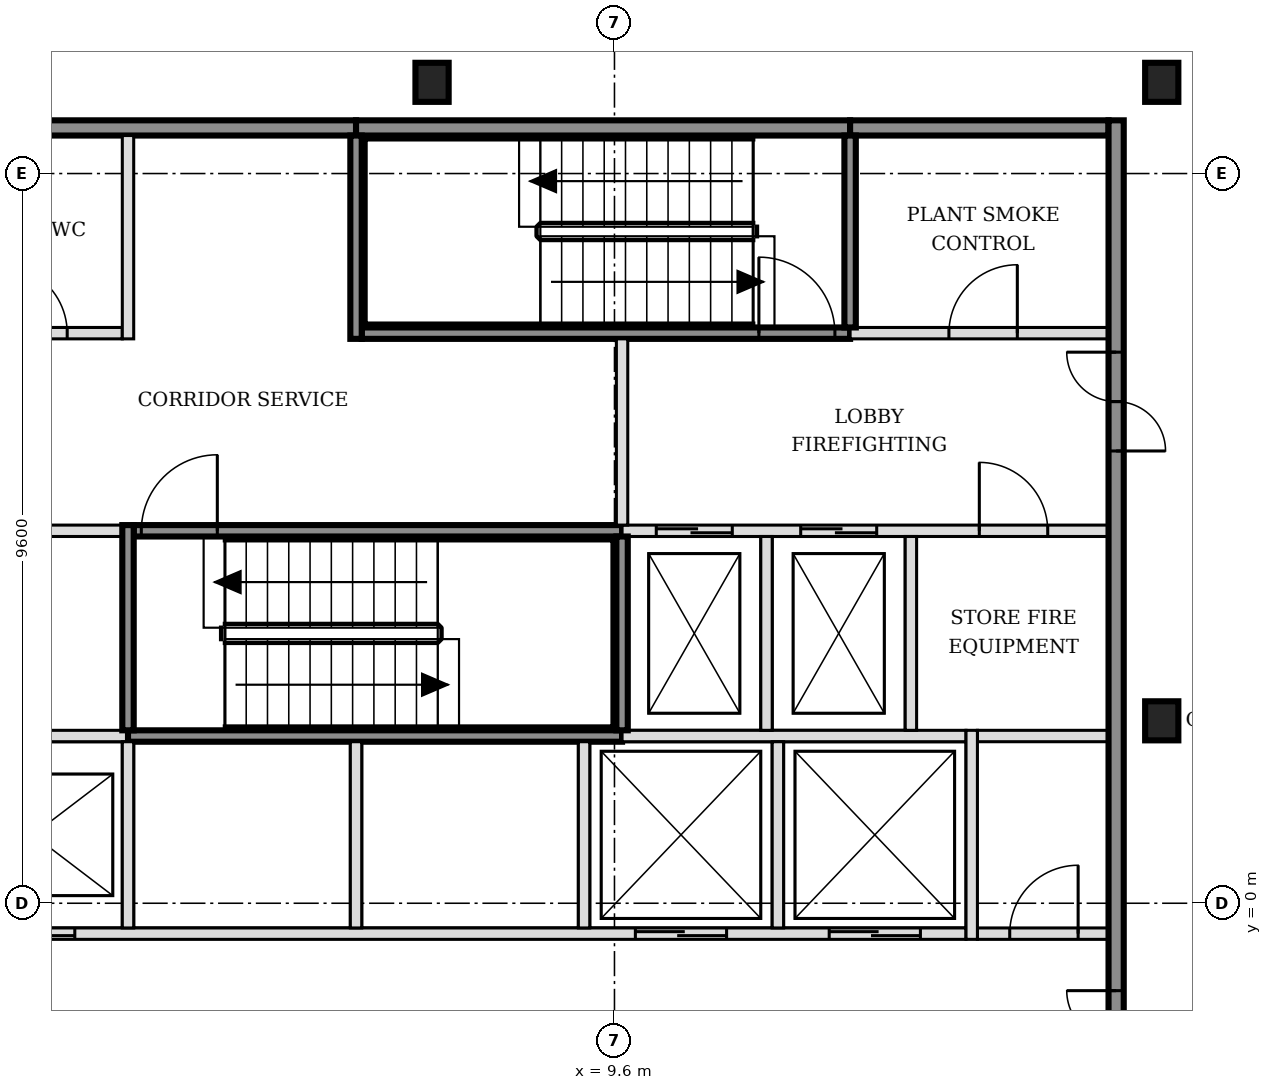
"""IFC4 building model, lengths in metres.
Left out: names, types, materials, properties, quantities, classifications, styles, units other than length and angle.
Written with IfcOpenShell. Run it as: python <this file> out.ifc"""

import sys

from ifc_helpers import new_model, si_unit, direction, frame, frame_2d, origin, origin_2d, place, context, subcontext, project, spatial, rectangle, i_section, extrude, element, fill, save


model = new_model("IFC4")
c1 = context("Model", 3, precision=1e-05, world=origin(), true_north=direction((0.0, 1.0)))
c2 = subcontext(c1, "Body", "Model", "MODEL_VIEW")
j1 = project(units=[si_unit("LENGTHUNIT", "METRE"), si_unit("PLANEANGLEUNIT", "RADIAN")], contexts=[c1])
p1 = place(None, origin())
s1 = spatial("IfcSite", under=j1, at=p1, CompositionType="ELEMENT")
p2 = place(p1, origin())
s2 = spatial("IfcBuilding", under=s1, at=p2, CompositionType="ELEMENT")
p3 = place(p2, frame((0.0, 0.0, 101.4)))
s3 = spatial("IfcBuildingStorey", under=s2, at=p3, CompositionType="ELEMENT", Elevation=101.4)
for number, where, z_axis, x_axis in (
    (1, (16.8, 2.4, -0.15), (0.0, 0.0, 1.0), (1.0, 0.0, 0.0)),
    (2, (7.2, 10.8, -0.15), (0.0, 0.0, 1.0), (1.0, 0.0, 0.0)),
    (3, (16.8, 10.8, -0.15), (0.0, 0.0, 1.0), (1.0, 0.0, 0.0)),
):
    element("IfcColumn", number, at=place(p3, frame(where, z_axis=z_axis, x_axis=x_axis)), inside=s3, PredefinedType="COLUMN", context=c2, shape_type="SweptSolid", body=[
        extrude(i_section(OverallWidth=0.437, OverallDepth=0.514, WebThickness=0.061, FlangeThickness=0.097, FilletRadius=0.015, at=origin_2d()), origin(), (0.0, 0.0, 1.0), 3.6),
    ])
p4 = place(p3, frame((-1.7, -0.4, 0.0), z_axis=(0.0, 0.0, 1.0), x_axis=(1.0, 0.0, 0.0)))
e4 = element("IfcWall", 4, at=p4, inside=s3, PredefinedType="SOLIDWALL", context=c2, shape_type="SweptSolid", body=[
    extrude(rectangle(XDim=15.925, YDim=0.15, at=frame_2d((7.962, 0.0))), origin(), (0.0, 0.0, 1.0), 3.45),
])
p5 = place(p4, frame((0.6, 0.0, 0.0)))
e5 = element("IfcOpeningElement", 5, at=p5, cuts=e4, PredefinedType="OPENING", context=c2, shape_type="SweptSolid", body=[
    extrude(rectangle(XDim=1.1, YDim=2.1, at=frame_2d((0.55, 1.05))), frame((0.0, 0.085, 0.0), z_axis=(0.0, -1.0, 0.0), x_axis=(1.0, 0.0, 0.0)), (0.0, 0.0, 1.0), 0.17),
])
p6 = place(p4, frame((3.1, 0.0, 0.0)))
e6 = element("IfcOpeningElement", 6, at=p6, cuts=e4, PredefinedType="OPENING", context=c2, shape_type="SweptSolid", body=[
    extrude(rectangle(XDim=1.1, YDim=2.1, at=frame_2d((0.55, 1.05))), frame((0.0, 0.085, 0.0), z_axis=(0.0, -1.0, 0.0), x_axis=(1.0, 0.0, 0.0)), (0.0, 0.0, 1.0), 0.17),
])
p7 = place(p4, frame((11.575, 0.0, 0.0)))
e7 = element("IfcOpeningElement", 7, at=p7, cuts=e4, PredefinedType="OPENING", context=c2, shape_type="SweptSolid", body=[
    extrude(rectangle(XDim=1.2, YDim=2.1, at=frame_2d((0.6, 1.05))), frame((0.0, 0.085, 0.0), z_axis=(0.0, -1.0, 0.0), x_axis=(1.0, 0.0, 0.0)), (0.0, 0.0, 1.0), 0.17),
])
p8 = place(p4, frame((14.125, 0.0, 0.0)))
e8 = element("IfcOpeningElement", 8, at=p8, cuts=e4, PredefinedType="OPENING", context=c2, shape_type="SweptSolid", body=[
    extrude(rectangle(XDim=1.2, YDim=2.1, at=frame_2d((0.6, 1.05))), frame((0.0, 0.085, 0.0), z_axis=(0.0, -1.0, 0.0), x_axis=(1.0, 0.0, 0.0)), (0.0, 0.0, 1.0), 0.17),
])
p9 = place(p3, frame((14.375, -0.4, 0.0), z_axis=(0.0, 0.0, 1.0), x_axis=(1.0, 0.0, 0.0)))
e9 = element("IfcWall", 9, at=p9, inside=s3, PredefinedType="PARTITIONING", context=c2, shape_type="SweptSolid", body=[
    extrude(rectangle(XDim=1.725, YDim=0.15, at=frame_2d((0.863, 0.0))), origin(), (0.0, 0.0, 1.0), 3.45),
])
p10 = place(p9, frame((0.425, 0.0, 0.0)))
e10 = element("IfcOpeningElement", 10, at=p10, cuts=e9, PredefinedType="OPENING", context=c2, shape_type="SweptSolid", body=[
    extrude(rectangle(XDim=0.9, YDim=2.1, at=frame_2d((0.45, 1.05))), frame((0.0, 0.085, 0.0), z_axis=(0.0, -1.0, 0.0), x_axis=(1.0, 0.0, 0.0)), (0.0, 0.0, 1.0), 0.17),
])
p11 = place(p3, frame((-1.7, 2.2, 0.0), z_axis=(0.0, 0.0, 1.0), x_axis=(1.0, 0.0, 0.0)))
e11 = element("IfcWall", 11, at=p11, inside=s3, PredefinedType="SOLIDWALL", context=c2, shape_type="SweptSolid", body=[
    extrude(rectangle(XDim=4.9, YDim=0.15, at=frame_2d((2.45, 0.0))), origin(), (0.0, 0.0, 1.0), 3.45),
])
p12 = place(p3, frame((3.2, 2.2, 0.0), z_axis=(0.0, 0.0, 1.0), x_axis=(1.0, 0.0, 0.0)))
e12 = element("IfcWall", 12, at=p12, inside=s3, PredefinedType="SOLIDWALL", context=c2, shape_type="SweptSolid", body=[
    extrude(rectangle(XDim=6.5, YDim=0.15, at=frame_2d((3.25, 0.0))), origin(), (0.0, 0.0, 1.0), 3.45),
])
p13 = place(p3, frame((9.7, 2.2, 0.0), z_axis=(0.0, 0.0, 1.0), x_axis=(1.0, 0.0, 0.0)))
e13 = element("IfcWall", 13, at=p13, inside=s3, PredefinedType="SOLIDWALL", context=c2, shape_type="SweptSolid", body=[
    extrude(rectangle(XDim=4.525, YDim=0.15, at=frame_2d((2.263, 0.0))), origin(), (0.0, 0.0, 1.0), 3.45),
])
p14 = place(p3, frame((14.375, 2.2, 0.0), z_axis=(0.0, 0.0, 1.0), x_axis=(1.0, 0.0, 0.0)))
e14 = element("IfcWall", 14, at=p14, inside=s3, PredefinedType="PARTITIONING", context=c2, shape_type="SweptSolid", body=[
    extrude(rectangle(XDim=1.725, YDim=0.15, at=frame_2d((0.863, 0.0))), origin(), (0.0, 0.0, 1.0), 3.45),
])
p15 = place(p3, frame((-1.7, 4.9, 0.0), z_axis=(0.0, 0.0, 1.0), x_axis=(1.0, 0.0, 0.0)))
e15 = element("IfcWall", 15, at=p15, inside=s3, PredefinedType="PARTITIONING", context=c2, shape_type="SweptSolid", body=[
    extrude(rectangle(XDim=4.825, YDim=0.15, at=frame_2d((2.413, 0.0))), origin(), (0.0, 0.0, 1.0), 3.45),
])
p16 = place(p15, frame((1.95, 0.0, 0.0)))
e16 = element("IfcOpeningElement", 16, at=p16, cuts=e15, PredefinedType="OPENING", context=c2, shape_type="SweptSolid", body=[
    extrude(rectangle(XDim=0.9, YDim=2.1, at=frame_2d((0.45, 1.05))), frame((0.0, 0.085, 0.0), z_axis=(0.0, -1.0, 0.0), x_axis=(1.0, 0.0, 0.0)), (0.0, 0.0, 1.0), 0.17),
])
p17 = place(p3, frame((3.275, 4.9, 0.0), z_axis=(0.0, 0.0, 1.0), x_axis=(1.0, 0.0, 0.0)))
e17 = element("IfcWall", 17, at=p17, inside=s3, PredefinedType="SOLIDWALL", context=c2, shape_type="SweptSolid", body=[
    extrude(rectangle(XDim=6.425, YDim=0.15, at=frame_2d((3.212, 0.0))), origin(), (0.0, 0.0, 1.0), 3.45),
])
p18 = place(p17, frame((0.1, 0.0, 0.0)))
e18 = element("IfcOpeningElement", 18, at=p18, cuts=e17, PredefinedType="OPENING", context=c2, shape_type="SweptSolid", body=[
    extrude(rectangle(XDim=1.0, YDim=2.1, at=frame_2d((0.5, 1.05))), frame((0.0, 0.085, 0.0), z_axis=(0.0, -1.0, 0.0), x_axis=(1.0, 0.0, 0.0)), (0.0, 0.0, 1.0), 0.17),
])
p19 = place(p3, frame((9.7, 4.9, 0.0), z_axis=(0.0, 0.0, 1.0), x_axis=(1.0, 0.0, 0.0)))
e19 = element("IfcWall", 19, at=p19, inside=s3, PredefinedType="SOLIDWALL", context=c2, shape_type="SweptSolid", body=[
    extrude(rectangle(XDim=6.4, YDim=0.15, at=frame_2d((3.2, 0.0))), origin(), (0.0, 0.0, 1.0), 3.45),
])
p20 = place(p19, frame((0.45, 0.0, 0.0)))
e20 = element("IfcOpeningElement", 20, at=p20, cuts=e19, PredefinedType="OPENING", context=c2, shape_type="SweptSolid", body=[
    extrude(rectangle(XDim=1.0, YDim=2.1, at=frame_2d((0.5, 1.05))), frame((0.0, 0.085, 0.0), z_axis=(0.0, -1.0, 0.0), x_axis=(1.0, 0.0, 0.0)), (0.0, 0.0, 1.0), 0.17),
])
p21 = place(p19, frame((2.35, 0.0, 0.0)))
e21 = element("IfcOpeningElement", 21, at=p21, cuts=e19, PredefinedType="OPENING", context=c2, shape_type="SweptSolid", body=[
    extrude(rectangle(XDim=1.0, YDim=2.1, at=frame_2d((0.5, 1.05))), frame((0.0, 0.085, 0.0), z_axis=(0.0, -1.0, 0.0), x_axis=(1.0, 0.0, 0.0)), (0.0, 0.0, 1.0), 0.17),
])
p22 = place(p19, frame((4.7, 0.0, 0.0)))
e22 = element("IfcOpeningElement", 22, at=p22, cuts=e19, PredefinedType="OPENING", context=c2, shape_type="SweptSolid", body=[
    extrude(rectangle(XDim=0.9, YDim=2.1, at=frame_2d((0.45, 1.05))), frame((0.0, 0.085, 0.0), z_axis=(0.0, -1.0, 0.0), x_axis=(1.0, 0.0, 0.0)), (0.0, 0.0, 1.0), 0.17),
])
p23 = place(p3, frame((-1.7, 7.5, 0.0), z_axis=(0.0, 0.0, 1.0), x_axis=(1.0, 0.0, 0.0)))
e23 = element("IfcWall", 23, at=p23, inside=s3, PredefinedType="PARTITIONING", context=c2, shape_type="SweptSolid", body=[
    extrude(rectangle(XDim=4.825, YDim=0.15, at=frame_2d((2.413, 0.0))), origin(), (0.0, 0.0, 1.0), 3.45),
])
p24 = place(p23, frame((0.7, 0.0, 0.0)))
e24 = element("IfcOpeningElement", 24, at=p24, cuts=e23, PredefinedType="OPENING", context=c2, shape_type="SweptSolid", body=[
    extrude(rectangle(XDim=0.9, YDim=2.1, at=frame_2d((0.45, 1.05))), frame((0.0, 0.085, 0.0), z_axis=(0.0, -1.0, 0.0), x_axis=(1.0, 0.0, 0.0)), (0.0, 0.0, 1.0), 0.17),
])
p25 = place(p23, frame((3.2, 0.0, 0.0)))
e25 = element("IfcOpeningElement", 25, at=p25, cuts=e23, PredefinedType="OPENING", context=c2, shape_type="SweptSolid", body=[
    extrude(rectangle(XDim=0.9, YDim=2.1, at=frame_2d((0.45, 1.05))), frame((0.0, 0.085, 0.0), z_axis=(0.0, -1.0, 0.0), x_axis=(1.0, 0.0, 0.0)), (0.0, 0.0, 1.0), 0.17),
])
p26 = place(p3, frame((6.275, 7.5, 0.0), z_axis=(0.0, 0.0, 1.0), x_axis=(1.0, 0.0, 0.0)))
e26 = element("IfcWall", 26, at=p26, inside=s3, PredefinedType="SOLIDWALL", context=c2, shape_type="SweptSolid", body=[
    extrude(rectangle(XDim=6.425, YDim=0.15, at=frame_2d((3.212, 0.0))), origin(), (0.0, 0.0, 1.0), 3.45),
])
p27 = place(p26, frame((5.225, 0.0, 0.0)))
e27 = element("IfcOpeningElement", 27, at=p27, cuts=e26, PredefinedType="OPENING", context=c2, shape_type="SweptSolid", body=[
    extrude(rectangle(XDim=1.0, YDim=2.1, at=frame_2d((0.5, 1.05))), frame((0.0, 0.085, 0.0), z_axis=(0.0, -1.0, 0.0), x_axis=(1.0, 0.0, 0.0)), (0.0, 0.0, 1.0), 0.17),
])
p28 = place(p3, frame((12.7, 7.5, 0.0), z_axis=(0.0, 0.0, 1.0), x_axis=(1.0, 0.0, 0.0)))
e28 = element("IfcWall", 28, at=p28, inside=s3, PredefinedType="SOLIDWALL", context=c2, shape_type="SweptSolid", body=[
    extrude(rectangle(XDim=3.4, YDim=0.15, at=frame_2d((1.7, 0.0))), origin(), (0.0, 0.0, 1.0), 3.45),
])
p29 = place(p28, frame((1.3, 0.0, 0.0)))
e29 = element("IfcOpeningElement", 29, at=p29, cuts=e28, PredefinedType="OPENING", context=c2, shape_type="SweptSolid", body=[
    extrude(rectangle(XDim=0.9, YDim=2.1, at=frame_2d((0.45, 1.05))), frame((0.0, 0.085, 0.0), z_axis=(0.0, -1.0, 0.0), x_axis=(1.0, 0.0, 0.0)), (0.0, 0.0, 1.0), 0.17),
])
p30 = place(p3, frame((-1.7, 10.2, 0.0), z_axis=(0.0, 0.0, 1.0), x_axis=(1.0, 0.0, 0.0)))
e30 = element("IfcWall", 30, at=p30, inside=s3, PredefinedType="SOLIDWALL", context=c2, shape_type="SweptSolid", body=[
    extrude(rectangle(XDim=7.9, YDim=0.2, at=frame_2d((3.95, 0.0))), origin(), (0.0, 0.0, 1.0), 3.45),
])
p31 = place(p3, frame((6.2, 10.2, 0.0), z_axis=(0.0, 0.0, 1.0), x_axis=(1.0, 0.0, 0.0)))
e31 = element("IfcWall", 31, at=p31, inside=s3, PredefinedType="SOLIDWALL", context=c2, shape_type="SweptSolid", body=[
    extrude(rectangle(XDim=6.5, YDim=0.2, at=frame_2d((3.25, 0.0))), origin(), (0.0, 0.0, 1.0), 3.45),
])
p32 = place(p3, frame((12.7, 10.2, 0.0), z_axis=(0.0, 0.0, 1.0), x_axis=(1.0, 0.0, 0.0)))
e32 = element("IfcWall", 32, at=p32, inside=s3, PredefinedType="SOLIDWALL", context=c2, shape_type="SweptSolid", body=[
    extrude(rectangle(XDim=3.4, YDim=0.2, at=frame_2d((1.7, 0.0))), origin(), (0.0, 0.0, 1.0), 3.45),
])
p33 = place(p3, frame((3.2, -0.325, 0.0), z_axis=(0.0, 0.0, 1.0), x_axis=(0.0, 1.0, 0.0)))
e33 = element("IfcWall", 33, at=p33, inside=s3, PredefinedType="SOLIDWALL", context=c2, shape_type="SweptSolid", body=[
    extrude(rectangle(XDim=2.45, YDim=0.15, at=frame_2d((1.225, 0.0))), origin(), (0.0, 0.0, 1.0), 3.45),
])
p34 = place(p3, frame((3.2, 2.275, 0.0), z_axis=(0.0, 0.0, 1.0), x_axis=(0.0, 1.0, 0.0)))
e34 = element("IfcWall", 34, at=p34, inside=s3, PredefinedType="SOLIDWALL", context=c2, shape_type="SweptSolid", body=[
    extrude(rectangle(XDim=2.7, YDim=0.15, at=frame_2d((1.35, 0.0))), origin(), (0.0, 0.0, 1.0), 3.45),
])
p35 = place(p3, frame((3.2, 7.425, 0.0), z_axis=(0.0, 0.0, 1.0), x_axis=(0.0, 1.0, 0.0)))
e35 = element("IfcWall", 35, at=p35, inside=s3, PredefinedType="PARTITIONING", context=c2, shape_type="SweptSolid", body=[
    extrude(rectangle(XDim=2.675, YDim=0.15, at=frame_2d((1.337, 0.0))), origin(), (0.0, 0.0, 1.0), 3.45),
])
p36 = place(p3, frame((6.2, -0.325, 0.0), z_axis=(0.0, 0.0, 1.0), x_axis=(0.0, 1.0, 0.0)))
e36 = element("IfcWall", 36, at=p36, inside=s3, PredefinedType="SOLIDWALL", context=c2, shape_type="SweptSolid", body=[
    extrude(rectangle(XDim=2.45, YDim=0.15, at=frame_2d((1.225, 0.0))), origin(), (0.0, 0.0, 1.0), 3.45),
])
p37 = place(p3, frame((6.2, 7.425, 0.0), z_axis=(0.0, 0.0, 1.0), x_axis=(0.0, 1.0, 0.0)))
e37 = element("IfcWall", 37, at=p37, inside=s3, PredefinedType="SOLIDWALL", context=c2, shape_type="SweptSolid", body=[
    extrude(rectangle(XDim=2.675, YDim=0.15, at=frame_2d((1.337, 0.0))), origin(), (0.0, 0.0, 1.0), 3.45),
])
p38 = place(p3, frame((9.2, -0.325, 0.0), z_axis=(0.0, 0.0, 1.0), x_axis=(0.0, 1.0, 0.0)))
e38 = element("IfcWall", 38, at=p38, inside=s3, PredefinedType="SOLIDWALL", context=c2, shape_type="SweptSolid", body=[
    extrude(rectangle(XDim=2.45, YDim=0.15, at=frame_2d((1.225, 0.0))), origin(), (0.0, 0.0, 1.0), 3.45),
])
p39 = place(p3, frame((9.7, 2.275, 0.0), z_axis=(0.0, 0.0, 1.0), x_axis=(0.0, 1.0, 0.0)))
e39 = element("IfcWall", 39, at=p39, inside=s3, PredefinedType="SOLIDWALL", context=c2, shape_type="SweptSolid", body=[
    extrude(rectangle(XDim=2.55, YDim=0.15, at=frame_2d((1.275, 0.0))), origin(), (0.0, 0.0, 1.0), 3.45),
])
p40 = place(p3, frame((9.7, 4.975, 0.0), z_axis=(0.0, 0.0, 1.0), x_axis=(0.0, 1.0, 0.0)))
e40 = element("IfcWall", 40, at=p40, inside=s3, PredefinedType="SOLIDWALL", context=c2, shape_type="SweptSolid", body=[
    extrude(rectangle(XDim=2.45, YDim=0.15, at=frame_2d((1.225, 0.0))), origin(), (0.0, 0.0, 1.0), 3.45),
])
p41 = place(p3, frame((11.6, 2.275, 0.0), z_axis=(0.0, 0.0, 1.0), x_axis=(0.0, 1.0, 0.0)))
e41 = element("IfcWall", 41, at=p41, inside=s3, PredefinedType="SOLIDWALL", context=c2, shape_type="SweptSolid", body=[
    extrude(rectangle(XDim=2.55, YDim=0.15, at=frame_2d((1.275, 0.0))), origin(), (0.0, 0.0, 1.0), 3.45),
])
p42 = place(p3, frame((11.75, -0.325, 0.0), z_axis=(0.0, 0.0, 1.0), x_axis=(0.0, 1.0, 0.0)))
e42 = element("IfcWall", 42, at=p42, inside=s3, PredefinedType="SOLIDWALL", context=c2, shape_type="SweptSolid", body=[
    extrude(rectangle(XDim=2.45, YDim=0.15, at=frame_2d((1.225, 0.0))), origin(), (0.0, 0.0, 1.0), 3.45),
])
p43 = place(p3, frame((12.7, 7.575, 0.0), z_axis=(0.0, 0.0, 1.0), x_axis=(0.0, 1.0, 0.0)))
e43 = element("IfcWall", 43, at=p43, inside=s3, PredefinedType="SOLIDWALL", context=c2, shape_type="SweptSolid", body=[
    extrude(rectangle(XDim=2.525, YDim=0.15, at=frame_2d((1.263, 0.0))), origin(), (0.0, 0.0, 1.0), 3.45),
])
p44 = place(p3, frame((13.5, 2.275, 0.0), z_axis=(0.0, 0.0, 1.0), x_axis=(0.0, 1.0, 0.0)))
e44 = element("IfcWall", 44, at=p44, inside=s3, PredefinedType="SOLIDWALL", context=c2, shape_type="SweptSolid", body=[
    extrude(rectangle(XDim=2.55, YDim=0.15, at=frame_2d((1.275, 0.0))), origin(), (0.0, 0.0, 1.0), 3.45),
])
p45 = place(p3, frame((14.3, -0.475, 0.0), z_axis=(0.0, 0.0, 1.0), x_axis=(0.0, 1.0, 0.0)))
e45 = element("IfcWall", 45, at=p45, inside=s3, PredefinedType="SOLIDWALL", context=c2, shape_type="SweptSolid", body=[
    extrude(rectangle(XDim=2.75, YDim=0.15, at=frame_2d((1.375, 0.0))), origin(), (0.0, 0.0, 1.0), 3.45),
])
p46 = place(p3, frame((16.2, -5.5, 0.0), z_axis=(0.0, 0.0, 1.0), x_axis=(0.0, 1.0, 0.0)))
e46 = element("IfcWall", 46, at=p46, inside=s3, PredefinedType="SOLIDWALL", context=c2, shape_type="SweptSolid", body=[
    extrude(rectangle(XDim=15.8, YDim=0.2, at=frame_2d((7.9, 0.0))), origin(), (0.0, 0.0, 1.0), 3.45),
])
p47 = place(p46, frame((3.05, 0.0, 0.0)))
e47 = element("IfcOpeningElement", 47, at=p47, cuts=e46, PredefinedType="OPENING", context=c2, shape_type="SweptSolid", body=[
    extrude(rectangle(XDim=1.3, YDim=2.1, at=frame_2d((0.65, 1.05))), frame((0.0, 0.11, 0.0), z_axis=(0.0, -1.0, 0.0), x_axis=(1.0, 0.0, 0.0)), (0.0, 0.0, 1.0), 0.22),
])
p48 = place(p46, frame((11.45, 0.0, 0.0)))
e48 = element("IfcOpeningElement", 48, at=p48, cuts=e46, PredefinedType="OPENING", context=c2, shape_type="SweptSolid", body=[
    extrude(rectangle(XDim=1.3, YDim=2.1, at=frame_2d((0.65, 1.05))), frame((0.0, 0.11, 0.0), z_axis=(0.0, -1.0, 0.0), x_axis=(1.0, 0.0, 0.0)), (0.0, 0.0, 1.0), 0.22),
])
p49 = place(p6, origin())
e49 = element("IfcDoor", 49, at=p49, inside=s3, OperationType="DOUBLE_DOOR_SLIDING", PredefinedType="DOOR", context=c2, shape_type="SweptSolid", body=[
    extrude(rectangle(XDim=1.1, YDim=2.1, at=frame_2d((0.55, 1.05))), frame((0.0, 0.025, 0.0), z_axis=(0.0, -1.0, 0.0), x_axis=(1.0, 0.0, 0.0)), (0.0, 0.0, 1.0), 0.05),
])
fill(e6, e49)
p50 = place(p7, origin())
e50 = element("IfcDoor", 50, at=p50, inside=s3, OperationType="DOUBLE_DOOR_SLIDING", PredefinedType="DOOR", context=c2, shape_type="SweptSolid", body=[
    extrude(rectangle(XDim=1.2, YDim=2.1, at=frame_2d((0.6, 1.05))), frame((0.0, 0.025, 0.0), z_axis=(0.0, -1.0, 0.0), x_axis=(1.0, 0.0, 0.0)), (0.0, 0.0, 1.0), 0.05),
])
fill(e7, e50)
p51 = place(p8, origin())
e51 = element("IfcDoor", 51, at=p51, inside=s3, OperationType="DOUBLE_DOOR_SLIDING", PredefinedType="DOOR", context=c2, shape_type="SweptSolid", body=[
    extrude(rectangle(XDim=1.2, YDim=2.1, at=frame_2d((0.6, 1.05))), frame((0.0, 0.025, 0.0), z_axis=(0.0, -1.0, 0.0), x_axis=(1.0, 0.0, 0.0)), (0.0, 0.0, 1.0), 0.05),
])
fill(e8, e51)
p52 = place(p20, origin())
e52 = element("IfcDoor", 52, at=p52, inside=s3, OperationType="DOUBLE_DOOR_SLIDING", PredefinedType="DOOR", context=c2, shape_type="SweptSolid", body=[
    extrude(rectangle(XDim=1.0, YDim=2.1, at=frame_2d((0.5, 1.05))), frame((0.0, 0.025, 0.0), z_axis=(0.0, -1.0, 0.0), x_axis=(1.0, 0.0, 0.0)), (0.0, 0.0, 1.0), 0.05),
])
fill(e20, e52)
p53 = place(p21, origin())
e53 = element("IfcDoor", 53, at=p53, inside=s3, OperationType="DOUBLE_DOOR_SLIDING", PredefinedType="DOOR", context=c2, shape_type="SweptSolid", body=[
    extrude(rectangle(XDim=1.0, YDim=2.1, at=frame_2d((0.5, 1.05))), frame((0.0, 0.025, 0.0), z_axis=(0.0, -1.0, 0.0), x_axis=(1.0, 0.0, 0.0)), (0.0, 0.0, 1.0), 0.05),
])
fill(e21, e53)
p54 = place(p18, origin())
e54 = element("IfcDoor", 54, at=p54, inside=s3, OperationType="SINGLE_SWING_RIGHT", PredefinedType="DOOR", context=c2, shape_type="SweptSolid", body=[
    extrude(rectangle(XDim=1.0, YDim=2.1, at=frame_2d((0.5, 1.05))), frame((0.0, 0.025, 0.0), z_axis=(0.0, -1.0, 0.0), x_axis=(1.0, 0.0, 0.0)), (0.0, 0.0, 1.0), 0.05),
])
fill(e18, e54)
p55 = place(p27, origin())
e55 = element("IfcDoor", 55, at=p55, inside=s3, OperationType="SINGLE_SWING_LEFT", PredefinedType="DOOR", context=c2, shape_type="SweptSolid", body=[
    extrude(rectangle(XDim=1.0, YDim=2.1, at=frame_2d((0.5, 1.05))), frame((0.0, 0.025, 0.0), z_axis=(0.0, -1.0, 0.0), x_axis=(1.0, 0.0, 0.0)), (0.0, 0.0, 1.0), 0.05),
])
fill(e27, e55)
p56 = place(p47, origin())
e56 = element("IfcDoor", 56, at=p56, inside=s3, OperationType="DOUBLE_DOOR_SINGLE_SWING", PredefinedType="DOOR", context=c2, shape_type="SweptSolid", body=[
    extrude(rectangle(XDim=1.3, YDim=2.1, at=frame_2d((0.65, 1.05))), frame((0.0, 0.025, 0.0), z_axis=(0.0, -1.0, 0.0), x_axis=(1.0, 0.0, 0.0)), (0.0, 0.0, 1.0), 0.05),
])
fill(e47, e56)
p57 = place(p48, origin())
e57 = element("IfcDoor", 57, at=p57, inside=s3, OperationType="DOUBLE_DOOR_SINGLE_SWING", PredefinedType="DOOR", context=c2, shape_type="SweptSolid", body=[
    extrude(rectangle(XDim=1.3, YDim=2.1, at=frame_2d((0.65, 1.05))), frame((0.0, 0.025, 0.0), z_axis=(0.0, -1.0, 0.0), x_axis=(1.0, 0.0, 0.0)), (0.0, 0.0, 1.0), 0.05),
])
fill(e48, e57)
p58 = place(p10, origin())
e58 = element("IfcDoor", 58, at=p58, inside=s3, OperationType="SINGLE_SWING_RIGHT", PredefinedType="DOOR", context=c2, shape_type="SweptSolid", body=[
    extrude(rectangle(XDim=0.9, YDim=2.1, at=frame_2d((0.45, 1.05))), frame((0.0, 0.025, 0.0), z_axis=(0.0, -1.0, 0.0), x_axis=(1.0, 0.0, 0.0)), (0.0, 0.0, 1.0), 0.05),
])
fill(e10, e58)
p59 = place(p22, origin())
e59 = element("IfcDoor", 59, at=p59, inside=s3, OperationType="SINGLE_SWING_LEFT", PredefinedType="DOOR", context=c2, shape_type="SweptSolid", body=[
    extrude(rectangle(XDim=0.9, YDim=2.1, at=frame_2d((0.45, 1.05))), frame((0.0, 0.025, 0.0), z_axis=(0.0, -1.0, 0.0), x_axis=(1.0, 0.0, 0.0)), (0.0, 0.0, 1.0), 0.05),
])
fill(e22, e59)
p60 = place(p29, origin())
e60 = element("IfcDoor", 60, at=p60, inside=s3, OperationType="SINGLE_SWING_RIGHT", PredefinedType="DOOR", context=c2, shape_type="SweptSolid", body=[
    extrude(rectangle(XDim=0.9, YDim=2.1, at=frame_2d((0.45, 1.05))), frame((0.0, 0.025, 0.0), z_axis=(0.0, -1.0, 0.0), x_axis=(1.0, 0.0, 0.0)), (0.0, 0.0, 1.0), 0.05),
])
fill(e29, e60)
p61 = place(p25, origin())
e61 = element("IfcDoor", 61, at=p61, inside=s3, OperationType="SINGLE_SWING_LEFT", PredefinedType="DOOR", context=c2, shape_type="SweptSolid", body=[
    extrude(rectangle(XDim=0.9, YDim=2.1, at=frame_2d((0.45, 1.05))), frame((0.0, 0.025, 0.0), z_axis=(0.0, -1.0, 0.0), x_axis=(1.0, 0.0, 0.0)), (0.0, 0.0, 1.0), 0.05),
])
fill(e25, e61)
save(model, sys.argv[1])
